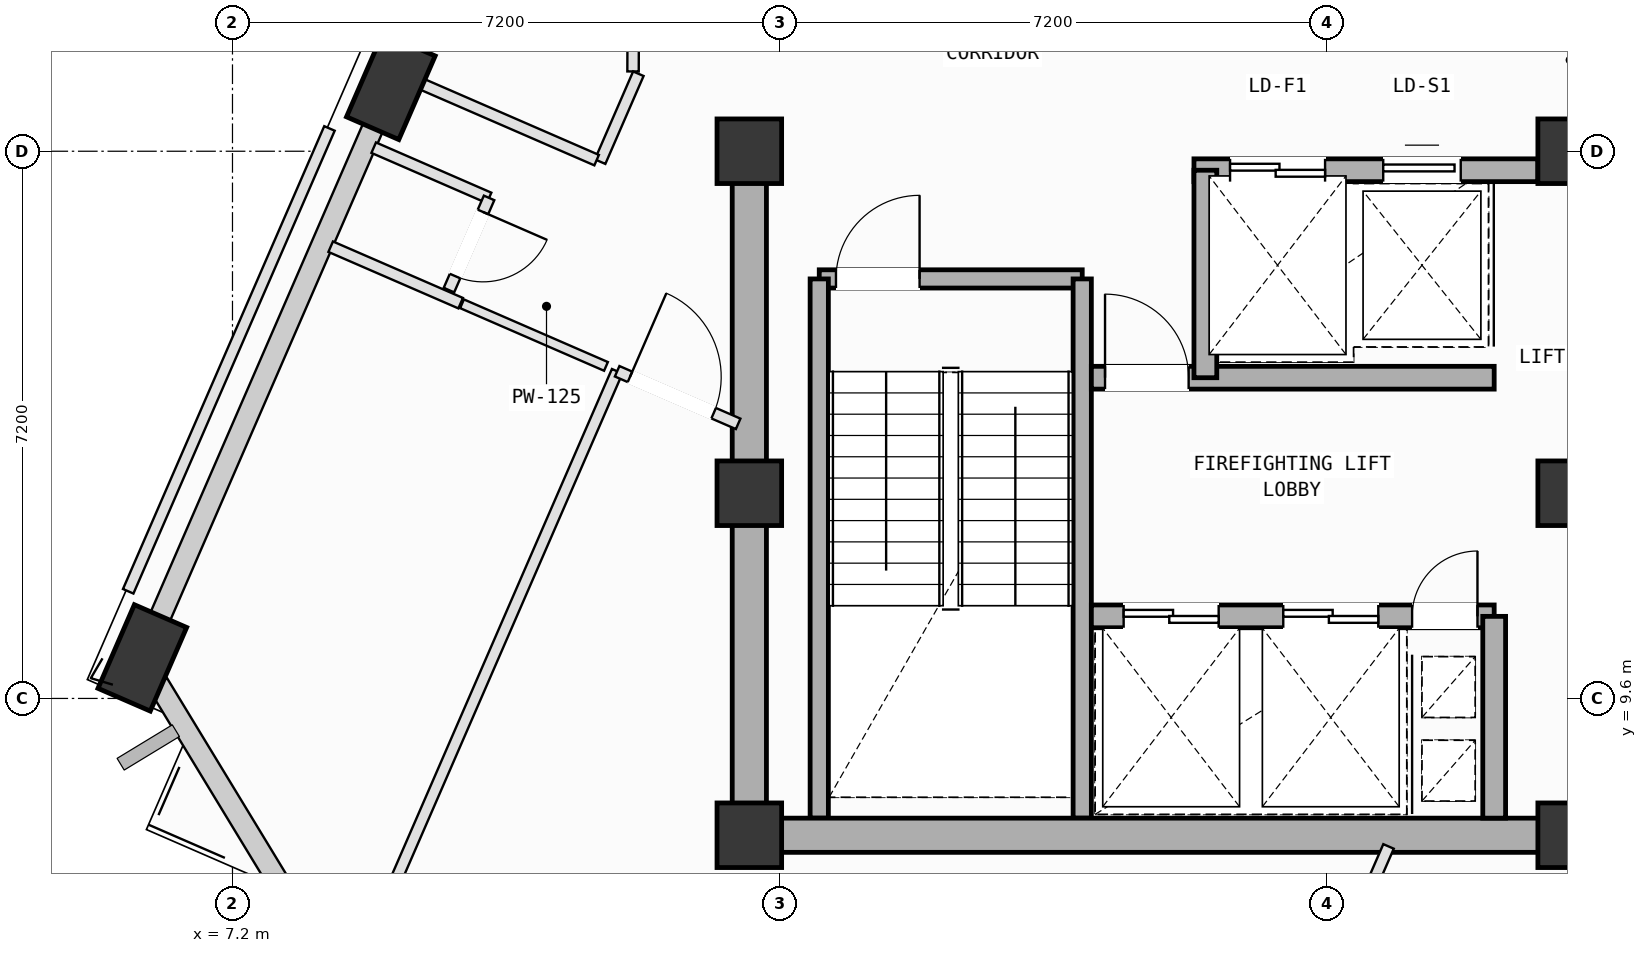
"""IFC4 building model, lengths in metres.
Left out: names, types, materials, properties, quantities, classifications, styles, units other than length and angle.
Written with IfcOpenShell. Run it as: python <this file> out.ifc"""

import sys

from ifc_helpers import new_model, si_unit, direction, frame, frame_2d, origin, origin_2d, place, context, subcontext, project, spatial, rectangle, extrude, element, fill, save


model = new_model("IFC4")
c1 = context("Model", 3, precision=1e-05, world=origin(), true_north=direction((0.0, 1.0)))
c2 = subcontext(c1, "Body", "Model", "MODEL_VIEW")
j1 = project(units=[si_unit("LENGTHUNIT", "METRE"), si_unit("PLANEANGLEUNIT", "RADIAN")], contexts=[c1])
p1 = place(None, origin())
s1 = spatial("IfcSite", under=j1, at=p1, CompositionType="ELEMENT")
p2 = place(p1, origin())
s2 = spatial("IfcBuilding", under=s1, at=p2, CompositionType="ELEMENT")
p3 = place(p2, frame((0.0, 0.0, 316.6)))
s3 = spatial("IfcBuildingStorey", under=s2, at=p3, CompositionType="ELEMENT", Elevation=316.6)
for number, where, z_axis, x_axis in (
    (1, (14.0, 7.8, 0.0), (0.0, 0.0, 1.0), (1.0, 0.0, 0.0)),
    (2, (14.0, 12.3, 0.0), (0.0, 0.0, 1.0), (1.0, 0.0, 0.0)),
    (3, (14.0, 16.8, 0.0), (0.0, 0.0, 1.0), (1.0, 0.0, 0.0)),
    (4, (24.8, 7.8, 0.0), (0.0, 0.0, 1.0), (1.0, 0.0, 0.0)),
    (5, (24.8, 12.3, 0.0), (0.0, 0.0, 1.0), (1.0, 0.0, 0.0)),
    (6, (24.8, 16.8, 0.0), (0.0, 0.0, 1.0), (1.0, 0.0, 0.0)),
):
    element("IfcColumn", number, at=place(p3, frame(where, z_axis=z_axis, x_axis=x_axis)), inside=s3, PredefinedType="COLUMN", context=c2, shape_type="SweptSolid", body=[
        extrude(rectangle(XDim=0.85, YDim=0.85, at=origin_2d()), origin(), (0.0, 0.0, 1.0), 4.0),
    ])
for number, where, z_axis, x_axis in (
    (7, (9.283, 17.654, 0.002), (0.0, 0.0, 1.0), (0.399, 0.917, 0.0)),
    (8, (6.014, 10.134, 0.002), (0.0, 0.0, 1.0), (0.399, 0.917, 0.0)),
):
    element("IfcColumn", number, at=place(p3, frame(where, z_axis=z_axis, x_axis=x_axis)), inside=s3, PredefinedType="COLUMN", context=c2, shape_type="SweptSolid", body=[
        extrude(rectangle(XDim=1.2, YDim=0.75, at=origin_2d()), origin(), (0.0, 0.0, 1.0), 3.996),
    ])
p4 = place(p3, frame((9.442, 18.018, 0.0), z_axis=(0.0, 0.0, 1.0), x_axis=(0.398768305896, 0.917051709672, 0.0)))
e9 = element("IfcWall", 9, at=p4, inside=s3, PredefinedType="SOLIDWALL", context=c2, shape_type="SweptSolid", body=[
    extrude(rectangle(XDim=7.405, YDim=0.28, at=frame_2d((3.703, 0.0))), origin(), (0.0, 0.0, 1.0), 3.265),
])
p5 = place(p3, frame((6.172, 10.498, 0.0), z_axis=(0.0, 0.0, 1.0), x_axis=(0.398740578379, 0.917063766133, 0.0)))
e10 = element("IfcWall", 10, at=p5, inside=s3, PredefinedType="SOLIDWALL", context=c2, shape_type="SweptSolid", body=[
    extrude(rectangle(XDim=7.405, YDim=0.28, at=frame_2d((3.702, 0.0))), origin(), (0.0, 0.0, 1.0), 3.265),
])
p6 = place(p3, frame((8.509, 6.027, 0.0), z_axis=(0.0, 0.0, 1.0), x_axis=(-0.51924554751, 0.854625099907, 0.0)))
e11 = element("IfcWall", 11, at=p6, inside=s3, PredefinedType="SOLIDWALL", context=c2, shape_type="SweptSolid", body=[
    extrude(rectangle(XDim=4.407, YDim=0.28, at=frame_2d((2.204, 0.0))), origin(), (0.0, 0.0, 1.0), 3.265),
])
p7 = place(p3, frame((14.92, 15.12, 0.0), z_axis=(0.0, 0.0, 1.0), x_axis=(1.0, 0.0, 0.0)))
e12 = element("IfcWall", 12, at=p7, inside=s3, PredefinedType="SOLIDWALL", context=c2, shape_type="SweptSolid", body=[
    extrude(rectangle(XDim=3.46, YDim=0.24, at=frame_2d((1.73, 0.0))), origin(), (0.0, 0.0, 1.0), 3.78),
])
p8 = place(p7, frame((0.22, 0.0, 0.0)))
e13 = element("IfcOpeningElement", 13, at=p8, cuts=e12, PredefinedType="OPENING", context=c2, shape_type="SweptSolid", body=[
    extrude(rectangle(XDim=1.1, YDim=2.15, at=frame_2d((0.55, 1.075))), frame((0.0, 0.13, 0.0), z_axis=(0.0, -1.0, 0.0), x_axis=(1.0, 0.0, 0.0)), (0.0, 0.0, 1.0), 0.26),
])
for number, where, z_axis, x_axis in (
    (14, (18.38, 15.12, 0.0), (0.0, 0.0, 1.0), (0.0, -1.0, 0.0)),
    (15, (14.92, 8.025, 0.0), (0.0, 0.0, 1.0), (0.0, 1.0, 0.0)),
):
    element("IfcWall", number, at=place(p3, frame(where, z_axis=z_axis, x_axis=x_axis)), inside=s3, PredefinedType="SOLIDWALL", context=c2, shape_type="SweptSolid", body=[
        extrude(rectangle(XDim=7.095, YDim=0.24, at=frame_2d((3.548, 0.0))), origin(), (0.0, 0.0, 1.0), 3.78),
    ])
p9 = place(p3, frame((14.0, 7.8, 0.0), z_axis=(0.0, 0.0, 1.0), x_axis=(1.0, 0.0, 0.0)))
e16 = element("IfcWall", 16, at=p9, inside=s3, PredefinedType="SHEAR", context=c2, shape_type="SweptSolid", body=[
    extrude(rectangle(XDim=10.8, YDim=0.45, at=frame_2d((5.4, 0.0))), origin(), (0.0, 0.0, 1.0), 3.78),
])
p10 = place(p3, frame((14.0, 16.8, 0.0), z_axis=(0.0, 0.0, 1.0), x_axis=(0.0, -1.0, 0.0)))
e17 = element("IfcWall", 17, at=p10, inside=s3, PredefinedType="SHEAR", context=c2, shape_type="SweptSolid", body=[
    extrude(rectangle(XDim=9.0, YDim=0.45, at=frame_2d((4.5, 0.0))), origin(), (0.0, 0.0, 1.0), 3.78),
])
p11 = place(p3, frame((19.85, 16.55, 0.0), z_axis=(0.0, 0.0, 1.0), x_axis=(1.0, 0.0, 0.0)))
e18 = element("IfcWall", 18, at=p11, inside=s3, PredefinedType="SOLIDWALL", context=c2, shape_type="SweptSolid", body=[
    extrude(rectangle(XDim=4.525, YDim=0.3, at=frame_2d((2.262, 0.0))), origin(), (0.0, 0.0, 1.0), 3.78),
])
p12 = place(p11, frame((0.475, 0.0, 0.0)))
e19 = element("IfcOpeningElement", 19, at=p12, cuts=e18, PredefinedType="OPENING", context=c2, shape_type="SweptSolid", body=[
    extrude(rectangle(XDim=1.25, YDim=2.18, at=frame_2d((0.625, 1.09))), frame((0.0, 0.16, 0.0), z_axis=(0.0, -1.0, 0.0), x_axis=(1.0, 0.0, 0.0)), (0.0, 0.0, 1.0), 0.32),
])
p13 = place(p11, frame((2.49, 0.0, 0.0)))
e20 = element("IfcOpeningElement", 20, at=p13, cuts=e18, PredefinedType="OPENING", context=c2, shape_type="SweptSolid", body=[
    extrude(rectangle(XDim=1.02, YDim=2.12, at=frame_2d((0.51, 1.06))), frame((0.0, 0.16, 0.0), z_axis=(0.0, -1.0, 0.0), x_axis=(1.0, 0.0, 0.0)), (0.0, 0.0, 1.0), 0.32),
])
p14 = place(p3, frame((18.5, 10.68, 0.0), z_axis=(0.0, 0.0, 1.0), x_axis=(1.0, 0.0, 0.0)))
e21 = element("IfcWall", 21, at=p14, inside=s3, PredefinedType="SOLIDWALL", context=c2, shape_type="SweptSolid", body=[
    extrude(rectangle(XDim=5.3, YDim=0.3, at=frame_2d((2.65, 0.0))), origin(), (0.0, 0.0, 1.0), 3.78),
])
p15 = place(p14, frame((4.22, 0.0, 0.0)))
e22 = element("IfcOpeningElement", 22, at=p15, cuts=e21, PredefinedType="OPENING", context=c2, shape_type="SweptSolid", body=[
    extrude(rectangle(XDim=0.86, YDim=2.06, at=frame_2d((0.43, 1.03))), frame((0.0, 0.16, 0.0), z_axis=(0.0, -1.0, 0.0), x_axis=(1.0, 0.0, 0.0)), (0.0, 0.0, 1.0), 0.32),
])
p16 = place(p14, frame((0.425, 0.0, 0.0)))
e23 = element("IfcOpeningElement", 23, at=p16, cuts=e21, PredefinedType="OPENING", context=c2, shape_type="SweptSolid", body=[
    extrude(rectangle(XDim=1.25, YDim=2.18, at=frame_2d((0.625, 1.09))), frame((0.0, 0.16, 0.0), z_axis=(0.0, -1.0, 0.0), x_axis=(1.0, 0.0, 0.0)), (0.0, 0.0, 1.0), 0.32),
])
p17 = place(p14, frame((2.525, 0.0, 0.0)))
e24 = element("IfcOpeningElement", 24, at=p17, cuts=e21, PredefinedType="OPENING", context=c2, shape_type="SweptSolid", body=[
    extrude(rectangle(XDim=1.25, YDim=2.18, at=frame_2d((0.625, 1.09))), frame((0.0, 0.16, 0.0), z_axis=(0.0, -1.0, 0.0), x_axis=(1.0, 0.0, 0.0)), (0.0, 0.0, 1.0), 0.32),
])
p18 = place(p3, frame((18.5, 13.82, 0.0), z_axis=(0.0, 0.0, 1.0), x_axis=(1.0, 0.0, 0.0)))
e25 = element("IfcWall", 25, at=p18, inside=s3, PredefinedType="SOLIDWALL", context=c2, shape_type="SweptSolid", body=[
    extrude(rectangle(XDim=5.3, YDim=0.3, at=frame_2d((2.65, 0.0))), origin(), (0.0, 0.0, 1.0), 3.78),
])
p19 = place(p18, frame((0.18, 0.0, 0.0)))
e26 = element("IfcOpeningElement", 26, at=p19, cuts=e25, PredefinedType="OPENING", context=c2, shape_type="SweptSolid", body=[
    extrude(rectangle(XDim=1.1, YDim=2.15, at=frame_2d((0.55, 1.075))), frame((0.0, 0.16, 0.0), z_axis=(0.0, -1.0, 0.0), x_axis=(1.0, 0.0, 0.0)), (0.0, 0.0, 1.0), 0.32),
])
p20 = place(p3, frame((23.8, 8.025, 0.0), z_axis=(0.0, 0.0, 1.0), x_axis=(0.0, 1.0, 0.0)))
e27 = element("IfcWall", 27, at=p20, inside=s3, PredefinedType="SOLIDWALL", context=c2, shape_type="SweptSolid", body=[
    extrude(rectangle(XDim=2.655, YDim=0.3, at=frame_2d((1.328, 0.0))), origin(), (0.0, 0.0, 1.0), 3.78),
])
p21 = place(p3, frame((20.0, 13.82, 0.0), z_axis=(0.0, 0.0, 1.0), x_axis=(0.0, 1.0, 0.0)))
e28 = element("IfcWall", 28, at=p21, inside=s3, PredefinedType="SOLIDWALL", context=c2, shape_type="SweptSolid", body=[
    extrude(rectangle(XDim=2.73, YDim=0.3, at=frame_2d((1.365, 0.0))), origin(), (0.0, 0.0, 1.0), 3.78),
])
p22 = place(p3, frame((20.345, 2.905, 0.0), z_axis=(0.0, 0.0, 1.0), x_axis=(0.398819215719, 0.917029570501, 0.0)))
e29 = element("IfcWall", 29, at=p22, inside=s3, PredefinedType="PARTITIONING", context=c2, shape_type="SweptSolid", body=[
    extrude(rectangle(XDim=5.178, YDim=0.15, at=frame_2d((2.589, 0.0))), origin(), (0.0, 0.0, 1.0), 3.78),
])
p23 = place(p22, frame((2.075, 0.0, 0.0)))
e30 = element("IfcOpeningElement", 30, at=p23, cuts=e29, PredefinedType="OPENING", context=c2, shape_type="SweptSolid", body=[
    extrude(rectangle(XDim=0.86, YDim=2.06, at=frame_2d((0.43, 1.03))), frame((0.0, 0.085, 0.0), z_axis=(0.0, -1.0, 0.0), x_axis=(1.0, 0.0, 0.0)), (0.0, 0.0, 1.0), 0.17),
])
p24 = place(p3, frame((8.6, 5.487, 0.0), z_axis=(0.0, 0.0, 1.0), x_axis=(0.398808773401, 0.917034111829, 0.0)))
e31 = element("IfcWall", 31, at=p24, inside=s3, PredefinedType="PARTITIONING", context=c2, shape_type="SweptSolid", body=[
    extrude(rectangle(XDim=9.179, YDim=0.15, at=frame_2d((4.59, 0.0))), origin(), (0.0, 0.0, 1.0), 3.78),
])
p25 = place(p3, frame((12.261, 13.905, 0.0), z_axis=(0.0, 0.0, 1.0), x_axis=(0.91708123515, -0.398700398965, 0.0)))
e32 = element("IfcWall", 32, at=p25, inside=s3, PredefinedType="PARTITIONING", context=c2, shape_type="SweptSolid", body=[
    extrude(rectangle(XDim=1.736, YDim=0.15, at=frame_2d((0.868, 0.0))), origin(), (0.0, 0.0, 1.0), 3.78),
])
p26 = place(p25, frame((0.184, 0.0, 0.0)))
e33 = element("IfcOpeningElement", 33, at=p26, cuts=e32, PredefinedType="OPENING", context=c2, shape_type="SweptSolid", body=[
    extrude(rectangle(XDim=1.2, YDim=2.15, at=frame_2d((0.6, 1.075))), frame((0.0, 0.085, 0.0), z_axis=(0.0, -1.0, 0.0), x_axis=(1.0, 0.0, 0.0)), (0.0, 0.0, 1.0), 0.17),
])
p27 = place(p3, frame((8.492, 15.544, 0.0), z_axis=(0.0, 0.0, 1.0), x_axis=(0.917176199692, -0.398481892585, 0.0)))
e34 = element("IfcWall", 34, at=p27, inside=s3, PredefinedType="PARTITIONING", context=c2, shape_type="SweptSolid", body=[
    extrude(rectangle(XDim=1.864, YDim=0.15, at=frame_2d((0.932, 0.0))), origin(), (0.0, 0.0, 1.0), 3.78),
])
p28 = place(p3, frame((10.22, 14.793, 0.0), z_axis=(0.0, 0.0, 1.0), x_axis=(0.916985473765, -0.398920594735, 0.0)))
e35 = element("IfcWall", 35, at=p28, inside=s3, PredefinedType="PARTITIONING", context=c2, shape_type="SweptSolid", body=[
    extrude(rectangle(XDim=2.065, YDim=0.125, at=frame_2d((1.033, 0.0))), origin(), (0.0, 0.0, 1.0), 3.78),
])
p29 = place(p3, frame((12.479, 20.221, 0.0), z_axis=(0.0, 0.0, 1.0), x_axis=(-0.003810084589, -0.999992741601, 0.0)))
e36 = element("IfcWall", 36, at=p29, inside=s3, PredefinedType="PARTITIONING", context=c2, shape_type="SweptSolid", body=[
    extrude(rectangle(XDim=2.371, YDim=0.15, at=frame_2d((1.186, 0.0))), origin(), (0.0, 0.0, 1.0), 3.78),
])
p30 = place(p3, frame((12.54, 17.82, 0.0), z_axis=(0.0, 0.0, 1.0), x_axis=(-0.398655347011, -0.917100820139, 0.0)))
e37 = element("IfcWall", 37, at=p30, inside=s3, PredefinedType="PARTITIONING", context=c2, shape_type="SweptSolid", body=[
    extrude(rectangle(XDim=1.261, YDim=0.15, at=frame_2d((0.631, 0.0))), origin(), (0.0, 0.0, 1.0), 3.78),
])
p31 = place(p3, frame((11.991, 16.683, 0.0), z_axis=(0.0, 0.0, 1.0), x_axis=(-0.917068787669, 0.398729029146, 0.0)))
e38 = element("IfcWall", 38, at=p31, inside=s3, PredefinedType="PARTITIONING", context=c2, shape_type="SweptSolid", body=[
    extrude(rectangle(XDim=3.06, YDim=0.15, at=frame_2d((1.53, 0.0))), origin(), (0.0, 0.0, 1.0), 2.765),
])
p32 = place(p3, frame((5.828, 11.01, 0.0), z_axis=(0.0, 0.0, 1.0), x_axis=(0.398767783479, 0.917051936838, 0.0)))
e39 = element("IfcWall", 39, at=p32, inside=s3, PredefinedType="PARTITIONING", context=c2, shape_type="SweptSolid", body=[
    extrude(rectangle(XDim=6.641, YDim=0.15, at=frame_2d((3.32, 0.0))), origin(), (0.0, 0.0, 1.0), 3.78),
])
p33 = place(p3, frame((9.058, 16.847, 0.0), z_axis=(0.0, 0.0, 1.0), x_axis=(0.916856565806, -0.399216780382, 0.0)))
e40 = element("IfcWall", 40, at=p33, inside=s3, PredefinedType="PARTITIONING", context=c2, shape_type="SweptSolid", body=[
    extrude(rectangle(XDim=1.656, YDim=0.15, at=frame_2d((0.828, 0.0))), origin(), (0.0, 0.0, 1.0), 3.78),
])
p34 = place(p3, frame((10.576, 16.186, 0.0), z_axis=(0.0, 0.0, 1.0), x_axis=(-0.39896901737, -0.916964406713, 0.0)))
e41 = element("IfcWall", 41, at=p34, inside=s3, PredefinedType="PARTITIONING", context=c2, shape_type="SweptSolid", body=[
    extrude(rectangle(XDim=1.323, YDim=0.15, at=frame_2d((0.662, 0.0))), origin(), (0.0, 0.0, 1.0), 3.78),
])
p35 = place(p34, frame((0.201, 0.0, 0.0)))
e42 = element("IfcOpeningElement", 42, at=p35, cuts=e41, PredefinedType="OPENING", context=c2, shape_type="SweptSolid", body=[
    extrude(rectangle(XDim=0.92, YDim=2.1, at=frame_2d((0.46, 1.05))), frame((0.0, 0.085, 0.0), z_axis=(0.0, -1.0, 0.0), x_axis=(1.0, 0.0, 0.0)), (0.0, 0.0, 1.0), 0.17),
])
p36 = place(p8, origin())
e43 = element("IfcDoor", 43, at=p36, inside=s3, OperationType="SINGLE_SWING_RIGHT", PredefinedType="DOOR", context=c2, shape_type="SweptSolid", body=[
    extrude(rectangle(XDim=1.1, YDim=2.15, at=frame_2d((0.55, 1.075))), frame((0.0, 0.025, 0.0), z_axis=(0.0, -1.0, 0.0), x_axis=(1.0, 0.0, 0.0)), (0.0, 0.0, 1.0), 0.05),
])
fill(e13, e43)
p37 = place(p15, origin())
e44 = element("IfcDoor", 44, at=p37, inside=s3, OperationType="SINGLE_SWING_RIGHT", PredefinedType="DOOR", context=c2, shape_type="SweptSolid", body=[
    extrude(rectangle(XDim=0.86, YDim=2.06, at=frame_2d((0.43, 1.03))), frame((0.0, 0.025, 0.0), z_axis=(0.0, -1.0, 0.0), x_axis=(1.0, 0.0, 0.0)), (0.0, 0.0, 1.0), 0.05),
])
fill(e22, e44)
p38 = place(p19, origin())
e45 = element("IfcDoor", 45, at=p38, inside=s3, OperationType="SINGLE_SWING_LEFT", PredefinedType="DOOR", context=c2, shape_type="SweptSolid", body=[
    extrude(rectangle(XDim=1.1, YDim=2.15, at=frame_2d((0.55, 1.075))), frame((0.0, 0.025, 0.0), z_axis=(0.0, -1.0, 0.0), x_axis=(1.0, 0.0, 0.0)), (0.0, 0.0, 1.0), 0.05),
])
fill(e26, e45)
p39 = place(p16, origin())
e46 = element("IfcDoor", 46, at=p39, inside=s3, OperationType="DOUBLE_DOOR_SLIDING", PredefinedType="DOOR", context=c2, shape_type="SweptSolid", body=[
    extrude(rectangle(XDim=1.25, YDim=2.18, at=frame_2d((0.625, 1.09))), frame((0.0, 0.025, 0.0), z_axis=(0.0, -1.0, 0.0), x_axis=(1.0, 0.0, 0.0)), (0.0, 0.0, 1.0), 0.05),
])
fill(e23, e46)
p40 = place(p17, origin())
e47 = element("IfcDoor", 47, at=p40, inside=s3, OperationType="DOUBLE_DOOR_SLIDING", PredefinedType="DOOR", context=c2, shape_type="SweptSolid", body=[
    extrude(rectangle(XDim=1.25, YDim=2.18, at=frame_2d((0.625, 1.09))), frame((0.0, 0.025, 0.0), z_axis=(0.0, -1.0, 0.0), x_axis=(1.0, 0.0, 0.0)), (0.0, 0.0, 1.0), 0.05),
])
fill(e24, e47)
p41 = place(p12, origin())
e48 = element("IfcDoor", 48, at=p41, inside=s3, OperationType="DOUBLE_DOOR_SLIDING", PredefinedType="DOOR", context=c2, shape_type="SweptSolid", body=[
    extrude(rectangle(XDim=1.25, YDim=2.18, at=frame_2d((0.625, 1.09))), frame((0.0, 0.025, 0.0), z_axis=(0.0, -1.0, 0.0), x_axis=(1.0, 0.0, 0.0)), (0.0, 0.0, 1.0), 0.05),
])
fill(e19, e48)
p42 = place(p13, origin())
e49 = element("IfcDoor", 49, at=p42, inside=s3, OperationType="SLIDING_TO_LEFT", PredefinedType="DOOR", context=c2, shape_type="SweptSolid", body=[
    extrude(rectangle(XDim=1.02, YDim=2.12, at=frame_2d((0.51, 1.06))), frame((0.0, 0.025, 0.0), z_axis=(0.0, -1.0, 0.0), x_axis=(1.0, 0.0, 0.0)), (0.0, 0.0, 1.0), 0.05),
])
fill(e20, e49)
p43 = place(p26, origin())
e50 = element("IfcDoor", 50, at=p43, inside=s3, OperationType="SINGLE_SWING_LEFT", PredefinedType="DOOR", context=c2, shape_type="SweptSolid", body=[
    extrude(rectangle(XDim=1.2, YDim=2.15, at=frame_2d((0.6, 1.075))), frame((0.0, 0.025, 0.0), z_axis=(0.0, -1.0, 0.0), x_axis=(1.0, 0.0, 0.0)), (0.0, 0.0, 1.0), 0.05),
])
fill(e33, e50)
p44 = place(p35, origin())
e51 = element("IfcDoor", 51, at=p44, inside=s3, OperationType="SINGLE_SWING_LEFT", PredefinedType="DOOR", context=c2, shape_type="SweptSolid", body=[
    extrude(rectangle(XDim=0.92, YDim=2.1, at=frame_2d((0.46, 1.05))), frame((0.0, 0.025, 0.0), z_axis=(0.0, -1.0, 0.0), x_axis=(1.0, 0.0, 0.0)), (0.0, 0.0, 1.0), 0.05),
])
fill(e42, e51)
save(model, sys.argv[1])
